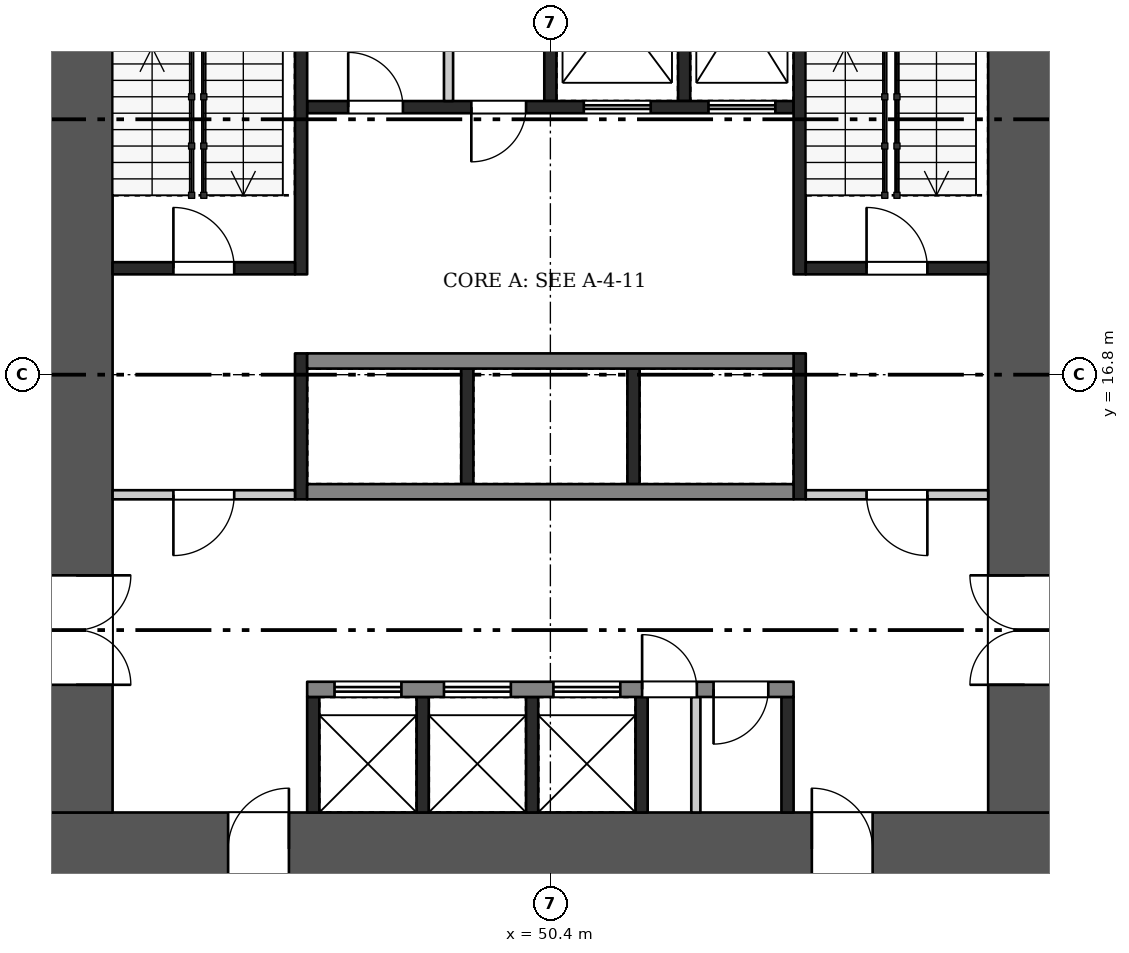
"""IFC4 building model, lengths in metres.
Left out: names, types, materials, properties, quantities, classifications, styles, units other than length and angle.
Written with IfcOpenShell. Run it as: python <this file> out.ifc"""

import sys

from ifc_helpers import new_model, si_unit, direction, frame, frame_2d, origin, place, context, subcontext, project, spatial, rectangle, extrude, element, fill, save


model = new_model("IFC4")
c1 = context("Model", 3, precision=1e-05, world=origin(), true_north=direction((0.0, 1.0)))
c2 = subcontext(c1, "Body", "Model", "MODEL_VIEW")
j1 = project(units=[si_unit("LENGTHUNIT", "METRE"), si_unit("PLANEANGLEUNIT", "RADIAN")], contexts=[c1])
p1 = place(None, origin())
s1 = spatial("IfcSite", under=j1, at=p1, CompositionType="ELEMENT")
p2 = place(p1, origin())
s2 = spatial("IfcBuilding", under=s1, at=p2, CompositionType="ELEMENT")
p3 = place(p2, frame((0.0, 0.0, 46.2)))
s3 = spatial("IfcBuildingStorey", under=s2, at=p3, CompositionType="ELEMENT", Elevation=46.2)
p4 = place(p3, frame((42.0, 9.0, 0.0), z_axis=(0.0, 0.0, 1.0), x_axis=(1.0, 0.0, 0.0)))
e1 = element("IfcWall", 1, at=p4, inside=s3, PredefinedType="SHEAR", context=c2, shape_type="SweptSolid", body=[
    extrude(rectangle(XDim=16.8, YDim=1.2, at=frame_2d((8.4, 0.0))), origin(), (0.0, 0.0, 1.0), 3.22),
])
p5 = place(p4, frame((3.1, 0.0, 0.0)))
e2 = element("IfcOpeningElement", 2, at=p5, cuts=e1, PredefinedType="OPENING", context=c2, shape_type="SweptSolid", body=[
    extrude(rectangle(XDim=1.0, YDim=2.1, at=frame_2d((0.5, 1.05))), frame((0.0, 0.61, 0.0), z_axis=(0.0, -1.0, 0.0), x_axis=(1.0, 0.0, 0.0)), (0.0, 0.0, 1.0), 1.22),
])
p6 = place(p4, frame((12.7, 0.0, 0.0)))
e3 = element("IfcOpeningElement", 3, at=p6, cuts=e1, PredefinedType="OPENING", context=c2, shape_type="SweptSolid", body=[
    extrude(rectangle(XDim=1.0, YDim=2.1, at=frame_2d((0.5, 1.05))), frame((0.0, 0.61, 0.0), z_axis=(0.0, -1.0, 0.0), x_axis=(1.0, 0.0, 0.0)), (0.0, 0.0, 1.0), 1.22),
])
p7 = place(p3, frame((42.6, 9.6, 0.0), z_axis=(0.0, 0.0, 1.0), x_axis=(0.0, 1.0, 0.0)))
e4 = element("IfcWall", 4, at=p7, inside=s3, PredefinedType="SHEAR", context=c2, shape_type="SweptSolid", body=[
    extrude(rectangle(XDim=14.4, YDim=1.2, at=frame_2d((7.2, 0.0))), origin(), (0.0, 0.0, 1.0), 3.22),
])
p8 = place(p7, frame((2.1, 0.0, 0.0)))
e5 = element("IfcOpeningElement", 5, at=p8, cuts=e4, PredefinedType="OPENING", context=c2, shape_type="SweptSolid", body=[
    extrude(rectangle(XDim=1.8, YDim=2.1, at=frame_2d((0.9, 1.05))), frame((0.0, 0.61, 0.0), z_axis=(0.0, -1.0, 0.0), x_axis=(1.0, 0.0, 0.0)), (0.0, 0.0, 1.0), 1.22),
])
p9 = place(p3, frame((58.2, 9.6, 0.0), z_axis=(0.0, 0.0, 1.0), x_axis=(0.0, 1.0, 0.0)))
e6 = element("IfcWall", 6, at=p9, inside=s3, PredefinedType="SHEAR", context=c2, shape_type="SweptSolid", body=[
    extrude(rectangle(XDim=14.4, YDim=1.2, at=frame_2d((7.2, 0.0))), origin(), (0.0, 0.0, 1.0), 3.22),
])
p10 = place(p9, frame((2.1, 0.0, 0.0)))
e7 = element("IfcOpeningElement", 7, at=p10, cuts=e6, PredefinedType="OPENING", context=c2, shape_type="SweptSolid", body=[
    extrude(rectangle(XDim=1.8, YDim=2.1, at=frame_2d((0.9, 1.05))), frame((0.0, 0.61, 0.0), z_axis=(0.0, -1.0, 0.0), x_axis=(1.0, 0.0, 0.0)), (0.0, 0.0, 1.0), 1.22),
])
for number, where, z_axis, x_axis in (
    (8, (46.5, 9.6, 0.0), (0.0, 0.0, 1.0), (0.0, 1.0, 0.0)),
    (9, (48.3, 9.6, 0.0), (0.0, 0.0, 1.0), (0.0, 1.0, 0.0)),
    (10, (50.1, 9.6, 0.0), (0.0, 0.0, 1.0), (0.0, 1.0, 0.0)),
    (11, (51.9, 9.6, 0.0), (0.0, 0.0, 1.0), (0.0, 1.0, 0.0)),
    (12, (54.3, 9.6, 0.0), (0.0, 0.0, 1.0), (0.0, 1.0, 0.0)),
):
    element("IfcWall", number, at=place(p3, frame(where, z_axis=z_axis, x_axis=x_axis)), inside=s3, PredefinedType="SHEAR", context=c2, shape_type="SweptSolid", body=[
        extrude(rectangle(XDim=1.9, YDim=0.2, at=frame_2d((0.95, 0.0))), origin(), (0.0, 0.0, 1.0), 3.22),
    ])
p11 = place(p3, frame((52.792, 9.6, 0.0), z_axis=(0.0, 0.0, 1.0), x_axis=(0.0, 1.0, 0.0)))
e13 = element("IfcWall", 13, at=p11, inside=s3, PredefinedType="PARTITIONING", context=c2, shape_type="SweptSolid", body=[
    extrude(rectangle(XDim=1.9, YDim=0.15, at=frame_2d((0.95, 0.0))), origin(), (0.0, 0.0, 1.0), 3.22),
])
p12 = place(p3, frame((46.4, 11.625, 0.0), z_axis=(0.0, 0.0, 1.0), x_axis=(1.0, 0.0, 0.0)))
e14 = element("IfcWall", 14, at=p12, inside=s3, PredefinedType="SHEAR", context=c2, shape_type="SweptSolid", body=[
    extrude(rectangle(XDim=8.0, YDim=0.25, at=frame_2d((4.0, 0.0))), origin(), (0.0, 0.0, 1.0), 3.22),
])
p13 = place(p12, frame((0.45, 0.0, 0.0)))
e15 = element("IfcOpeningElement", 15, at=p13, cuts=e14, PredefinedType="OPENING", context=c2, shape_type="SweptSolid", body=[
    extrude(rectangle(XDim=1.1, YDim=2.1, at=frame_2d((0.55, 1.05))), frame((0.0, 0.135, 0.0), z_axis=(0.0, -1.0, 0.0), x_axis=(1.0, 0.0, 0.0)), (0.0, 0.0, 1.0), 0.27),
])
p14 = place(p12, frame((2.25, 0.0, 0.0)))
e16 = element("IfcOpeningElement", 16, at=p14, cuts=e14, PredefinedType="OPENING", context=c2, shape_type="SweptSolid", body=[
    extrude(rectangle(XDim=1.1, YDim=2.1, at=frame_2d((0.55, 1.05))), frame((0.0, 0.135, 0.0), z_axis=(0.0, -1.0, 0.0), x_axis=(1.0, 0.0, 0.0)), (0.0, 0.0, 1.0), 0.27),
])
p15 = place(p12, frame((4.05, 0.0, 0.0)))
e17 = element("IfcOpeningElement", 17, at=p15, cuts=e14, PredefinedType="OPENING", context=c2, shape_type="SweptSolid", body=[
    extrude(rectangle(XDim=1.1, YDim=2.1, at=frame_2d((0.55, 1.05))), frame((0.0, 0.135, 0.0), z_axis=(0.0, -1.0, 0.0), x_axis=(1.0, 0.0, 0.0)), (0.0, 0.0, 1.0), 0.27),
])
p16 = place(p12, frame((5.509, 0.0, 0.0)))
e18 = element("IfcOpeningElement", 18, at=p16, cuts=e14, PredefinedType="OPENING", context=c2, shape_type="SweptSolid", body=[
    extrude(rectangle(XDim=0.9, YDim=2.1, at=frame_2d((0.45, 1.05))), frame((0.0, 0.135, 0.0), z_axis=(0.0, -1.0, 0.0), x_axis=(1.0, 0.0, 0.0)), (0.0, 0.0, 1.0), 0.27),
])
p17 = place(p12, frame((6.684, 0.0, 0.0)))
e19 = element("IfcOpeningElement", 19, at=p17, cuts=e14, PredefinedType="OPENING", context=c2, shape_type="SweptSolid", body=[
    extrude(rectangle(XDim=0.9, YDim=2.1, at=frame_2d((0.45, 1.05))), frame((0.0, 0.135, 0.0), z_axis=(0.0, -1.0, 0.0), x_axis=(1.0, 0.0, 0.0)), (0.0, 0.0, 1.0), 0.27),
])
for number, where, z_axis, x_axis in (
    (20, (49.033, 15.0, 0.0), (0.0, 0.0, 1.0), (0.0, 1.0, 0.0)),
    (21, (51.767, 15.0, 0.0), (0.0, 0.0, 1.0), (0.0, 1.0, 0.0)),
):
    element("IfcWall", number, at=place(p3, frame(where, z_axis=z_axis, x_axis=x_axis)), inside=s3, PredefinedType="SHEAR", context=c2, shape_type="SweptSolid", body=[
        extrude(rectangle(XDim=1.9, YDim=0.2, at=frame_2d((0.95, 0.0))), origin(), (0.0, 0.0, 1.0), 3.22),
    ])
for number, where, z_axis, x_axis in (
    (22, (46.4, 14.875, 0.0), (0.0, 0.0, 1.0), (1.0, 0.0, 0.0)),
    (23, (46.4, 17.025, 0.0), (0.0, 0.0, 1.0), (1.0, 0.0, 0.0)),
):
    element("IfcWall", number, at=place(p3, frame(where, z_axis=z_axis, x_axis=x_axis)), inside=s3, PredefinedType="SHEAR", context=c2, shape_type="SweptSolid", body=[
        extrude(rectangle(XDim=8.0, YDim=0.25, at=frame_2d((4.0, 0.0))), origin(), (0.0, 0.0, 1.0), 3.22),
    ])
for number, where, z_axis, x_axis in (
    (24, (50.4, 21.3, 0.0), (0.0, 0.0, 1.0), (0.0, 1.0, 0.0)),
    (25, (52.6, 21.3, 0.0), (0.0, 0.0, 1.0), (0.0, 1.0, 0.0)),
):
    element("IfcWall", number, at=place(p3, frame(where, z_axis=z_axis, x_axis=x_axis)), inside=s3, PredefinedType="SHEAR", context=c2, shape_type="SweptSolid", body=[
        extrude(rectangle(XDim=2.7, YDim=0.2, at=frame_2d((1.35, 0.0))), origin(), (0.0, 0.0, 1.0), 3.22),
    ])
p18 = place(p3, frame((48.725, 21.3, 0.0), z_axis=(0.0, 0.0, 1.0), x_axis=(0.0, 1.0, 0.0)))
e26 = element("IfcWall", 26, at=p18, inside=s3, PredefinedType="PARTITIONING", context=c2, shape_type="SweptSolid", body=[
    extrude(rectangle(XDim=2.7, YDim=0.15, at=frame_2d((1.35, 0.0))), origin(), (0.0, 0.0, 1.0), 3.22),
])
p19 = place(p3, frame((46.4, 21.2, 0.0), z_axis=(0.0, 0.0, 1.0), x_axis=(1.0, 0.0, 0.0)))
e27 = element("IfcWall", 27, at=p19, inside=s3, PredefinedType="SHEAR", context=c2, shape_type="SweptSolid", body=[
    extrude(rectangle(XDim=8.0, YDim=0.2, at=frame_2d((4.0, 0.0))), origin(), (0.0, 0.0, 1.0), 3.22),
])
p20 = place(p19, frame((0.675, 0.0, 0.0)))
e28 = element("IfcOpeningElement", 28, at=p20, cuts=e27, PredefinedType="OPENING", context=c2, shape_type="SweptSolid", body=[
    extrude(rectangle(XDim=0.9, YDim=2.1, at=frame_2d((0.45, 1.05))), frame((0.0, 0.11, 0.0), z_axis=(0.0, -1.0, 0.0), x_axis=(1.0, 0.0, 0.0)), (0.0, 0.0, 1.0), 0.22),
])
p21 = place(p19, frame((2.7, 0.0, 0.0)))
e29 = element("IfcOpeningElement", 29, at=p21, cuts=e27, PredefinedType="OPENING", context=c2, shape_type="SweptSolid", body=[
    extrude(rectangle(XDim=0.9, YDim=2.1, at=frame_2d((0.45, 1.05))), frame((0.0, 0.11, 0.0), z_axis=(0.0, -1.0, 0.0), x_axis=(1.0, 0.0, 0.0)), (0.0, 0.0, 1.0), 0.22),
])
p22 = place(p19, frame((4.55, 0.0, 0.0)))
e30 = element("IfcOpeningElement", 30, at=p22, cuts=e27, PredefinedType="OPENING", context=c2, shape_type="SweptSolid", body=[
    extrude(rectangle(XDim=1.1, YDim=2.1, at=frame_2d((0.55, 1.05))), frame((0.0, 0.11, 0.0), z_axis=(0.0, -1.0, 0.0), x_axis=(1.0, 0.0, 0.0)), (0.0, 0.0, 1.0), 0.22),
])
p23 = place(p19, frame((6.6, 0.0, 0.0)))
e31 = element("IfcOpeningElement", 31, at=p23, cuts=e27, PredefinedType="OPENING", context=c2, shape_type="SweptSolid", body=[
    extrude(rectangle(XDim=1.1, YDim=2.1, at=frame_2d((0.55, 1.05))), frame((0.0, 0.11, 0.0), z_axis=(0.0, -1.0, 0.0), x_axis=(1.0, 0.0, 0.0)), (0.0, 0.0, 1.0), 0.22),
])
p24 = place(p3, frame((46.3, 14.75, 0.0), z_axis=(0.0, 0.0, 1.0), x_axis=(0.0, 1.0, 0.0)))
e32 = element("IfcWall", 32, at=p24, inside=s3, PredefinedType="SHEAR", context=c2, shape_type="SweptSolid", body=[
    extrude(rectangle(XDim=2.4, YDim=0.2, at=frame_2d((1.2, 0.0))), origin(), (0.0, 0.0, 1.0), 3.22),
])
p25 = place(p3, frame((46.3, 18.45, 0.0), z_axis=(0.0, 0.0, 1.0), x_axis=(0.0, 1.0, 0.0)))
e33 = element("IfcWall", 33, at=p25, inside=s3, PredefinedType="SHEAR", context=c2, shape_type="SweptSolid", body=[
    extrude(rectangle(XDim=5.55, YDim=0.2, at=frame_2d((2.775, 0.0))), origin(), (0.0, 0.0, 1.0), 3.22),
])
p26 = place(p3, frame((43.2, 14.825, 0.0), z_axis=(0.0, 0.0, 1.0), x_axis=(1.0, 0.0, 0.0)))
e34 = element("IfcWall", 34, at=p26, inside=s3, PredefinedType="PARTITIONING", context=c2, shape_type="SweptSolid", body=[
    extrude(rectangle(XDim=3.0, YDim=0.15, at=frame_2d((1.5, 0.0))), origin(), (0.0, 0.0, 1.0), 3.22),
])
p27 = place(p26, frame((1.0, 0.0, 0.0)))
e35 = element("IfcOpeningElement", 35, at=p27, cuts=e34, PredefinedType="OPENING", context=c2, shape_type="SweptSolid", body=[
    extrude(rectangle(XDim=1.0, YDim=2.1, at=frame_2d((0.5, 1.05))), frame((0.0, 0.085, 0.0), z_axis=(0.0, -1.0, 0.0), x_axis=(1.0, 0.0, 0.0)), (0.0, 0.0, 1.0), 0.17),
])
p28 = place(p3, frame((43.2, 18.55, 0.0), z_axis=(0.0, 0.0, 1.0), x_axis=(1.0, 0.0, 0.0)))
e36 = element("IfcWall", 36, at=p28, inside=s3, PredefinedType="SHEAR", context=c2, shape_type="SweptSolid", body=[
    extrude(rectangle(XDim=3.0, YDim=0.2, at=frame_2d((1.5, 0.0))), origin(), (0.0, 0.0, 1.0), 3.22),
])
p29 = place(p28, frame((1.0, 0.0, 0.0)))
e37 = element("IfcOpeningElement", 37, at=p29, cuts=e36, PredefinedType="OPENING", context=c2, shape_type="SweptSolid", body=[
    extrude(rectangle(XDim=1.0, YDim=2.1, at=frame_2d((0.5, 1.05))), frame((0.0, 0.11, 0.0), z_axis=(0.0, -1.0, 0.0), x_axis=(1.0, 0.0, 0.0)), (0.0, 0.0, 1.0), 0.22),
])
p30 = place(p3, frame((54.5, 14.75, 0.0), z_axis=(0.0, 0.0, 1.0), x_axis=(0.0, 1.0, 0.0)))
e38 = element("IfcWall", 38, at=p30, inside=s3, PredefinedType="SHEAR", context=c2, shape_type="SweptSolid", body=[
    extrude(rectangle(XDim=2.4, YDim=0.2, at=frame_2d((1.2, 0.0))), origin(), (0.0, 0.0, 1.0), 3.22),
])
p31 = place(p3, frame((54.5, 18.45, 0.0), z_axis=(0.0, 0.0, 1.0), x_axis=(0.0, 1.0, 0.0)))
e39 = element("IfcWall", 39, at=p31, inside=s3, PredefinedType="SHEAR", context=c2, shape_type="SweptSolid", body=[
    extrude(rectangle(XDim=5.55, YDim=0.2, at=frame_2d((2.775, 0.0))), origin(), (0.0, 0.0, 1.0), 3.22),
])
p32 = place(p3, frame((54.6, 14.825, 0.0), z_axis=(0.0, 0.0, 1.0), x_axis=(1.0, 0.0, 0.0)))
e40 = element("IfcWall", 40, at=p32, inside=s3, PredefinedType="PARTITIONING", context=c2, shape_type="SweptSolid", body=[
    extrude(rectangle(XDim=3.0, YDim=0.15, at=frame_2d((1.5, 0.0))), origin(), (0.0, 0.0, 1.0), 3.22),
])
p33 = place(p32, frame((1.0, 0.0, 0.0)))
e41 = element("IfcOpeningElement", 41, at=p33, cuts=e40, PredefinedType="OPENING", context=c2, shape_type="SweptSolid", body=[
    extrude(rectangle(XDim=1.0, YDim=2.1, at=frame_2d((0.5, 1.05))), frame((0.0, 0.085, 0.0), z_axis=(0.0, -1.0, 0.0), x_axis=(1.0, 0.0, 0.0)), (0.0, 0.0, 1.0), 0.17),
])
p34 = place(p3, frame((54.6, 18.55, 0.0), z_axis=(0.0, 0.0, 1.0), x_axis=(1.0, 0.0, 0.0)))
e42 = element("IfcWall", 42, at=p34, inside=s3, PredefinedType="SHEAR", context=c2, shape_type="SweptSolid", body=[
    extrude(rectangle(XDim=3.0, YDim=0.2, at=frame_2d((1.5, 0.0))), origin(), (0.0, 0.0, 1.0), 3.22),
])
p35 = place(p34, frame((1.0, 0.0, 0.0)))
e43 = element("IfcOpeningElement", 43, at=p35, cuts=e42, PredefinedType="OPENING", context=c2, shape_type="SweptSolid", body=[
    extrude(rectangle(XDim=1.0, YDim=2.1, at=frame_2d((0.5, 1.05))), frame((0.0, 0.11, 0.0), z_axis=(0.0, -1.0, 0.0), x_axis=(1.0, 0.0, 0.0)), (0.0, 0.0, 1.0), 0.22),
])
p36 = place(p5, origin())
e44 = element("IfcDoor", 44, at=p36, inside=s3, OperationType="SINGLE_SWING_RIGHT", PredefinedType="DOOR", context=c2, shape_type="SweptSolid", body=[
    extrude(rectangle(XDim=1.0, YDim=2.1, at=frame_2d((0.5, 1.05))), frame((0.0, 0.025, 0.0), z_axis=(0.0, -1.0, 0.0), x_axis=(1.0, 0.0, 0.0)), (0.0, 0.0, 1.0), 0.05),
])
fill(e2, e44)
p37 = place(p6, origin())
e45 = element("IfcDoor", 45, at=p37, inside=s3, OperationType="SINGLE_SWING_LEFT", PredefinedType="DOOR", context=c2, shape_type="SweptSolid", body=[
    extrude(rectangle(XDim=1.0, YDim=2.1, at=frame_2d((0.5, 1.05))), frame((0.0, 0.025, 0.0), z_axis=(0.0, -1.0, 0.0), x_axis=(1.0, 0.0, 0.0)), (0.0, 0.0, 1.0), 0.05),
])
fill(e3, e45)
p38 = place(p8, frame((1.8, 0.0, 0.0), z_axis=(0.0, 0.0, 1.0), x_axis=(-1.0, 0.0, 0.0)))
e46 = element("IfcDoor", 46, at=p38, inside=s3, OperationType="DOUBLE_DOOR_SINGLE_SWING", PredefinedType="DOOR", context=c2, shape_type="SweptSolid", body=[
    extrude(rectangle(XDim=1.8, YDim=2.1, at=frame_2d((0.9, 1.05))), frame((0.0, 0.025, 0.0), z_axis=(0.0, -1.0, 0.0), x_axis=(1.0, 0.0, 0.0)), (0.0, 0.0, 1.0), 0.05),
])
fill(e5, e46)
p39 = place(p10, origin())
e47 = element("IfcDoor", 47, at=p39, inside=s3, OperationType="DOUBLE_DOOR_SINGLE_SWING", PredefinedType="DOOR", context=c2, shape_type="SweptSolid", body=[
    extrude(rectangle(XDim=1.8, YDim=2.1, at=frame_2d((0.9, 1.05))), frame((0.0, 0.025, 0.0), z_axis=(0.0, -1.0, 0.0), x_axis=(1.0, 0.0, 0.0)), (0.0, 0.0, 1.0), 0.05),
])
fill(e7, e47)
p40 = place(p13, origin())
e48 = element("IfcDoor", 48, at=p40, inside=s3, OperationType="DOUBLE_DOOR_SLIDING", PredefinedType="DOOR", context=c2, shape_type="SweptSolid", body=[
    extrude(rectangle(XDim=1.1, YDim=2.1, at=frame_2d((0.55, 1.05))), frame((0.0, 0.025, 0.0), z_axis=(0.0, -1.0, 0.0), x_axis=(1.0, 0.0, 0.0)), (0.0, 0.0, 1.0), 0.05),
])
fill(e15, e48)
p41 = place(p14, origin())
e49 = element("IfcDoor", 49, at=p41, inside=s3, OperationType="DOUBLE_DOOR_SLIDING", PredefinedType="DOOR", context=c2, shape_type="SweptSolid", body=[
    extrude(rectangle(XDim=1.1, YDim=2.1, at=frame_2d((0.55, 1.05))), frame((0.0, 0.025, 0.0), z_axis=(0.0, -1.0, 0.0), x_axis=(1.0, 0.0, 0.0)), (0.0, 0.0, 1.0), 0.05),
])
fill(e16, e49)
p42 = place(p15, origin())
e50 = element("IfcDoor", 50, at=p42, inside=s3, OperationType="DOUBLE_DOOR_SLIDING", PredefinedType="DOOR", context=c2, shape_type="SweptSolid", body=[
    extrude(rectangle(XDim=1.1, YDim=2.1, at=frame_2d((0.55, 1.05))), frame((0.0, 0.025, 0.0), z_axis=(0.0, -1.0, 0.0), x_axis=(1.0, 0.0, 0.0)), (0.0, 0.0, 1.0), 0.05),
])
fill(e17, e50)
p43 = place(p16, origin())
e51 = element("IfcDoor", 51, at=p43, inside=s3, OperationType="SINGLE_SWING_LEFT", PredefinedType="DOOR", context=c2, shape_type="SweptSolid", body=[
    extrude(rectangle(XDim=0.9, YDim=2.1, at=frame_2d((0.45, 1.05))), frame((0.0, 0.025, 0.0), z_axis=(0.0, -1.0, 0.0), x_axis=(1.0, 0.0, 0.0)), (0.0, 0.0, 1.0), 0.05),
])
fill(e18, e51)
p44 = place(p17, frame((0.9, 0.0, 0.0), z_axis=(0.0, 0.0, 1.0), x_axis=(-1.0, 0.0, 0.0)))
e52 = element("IfcDoor", 52, at=p44, inside=s3, OperationType="SINGLE_SWING_RIGHT", PredefinedType="DOOR", context=c2, shape_type="SweptSolid", body=[
    extrude(rectangle(XDim=0.9, YDim=2.1, at=frame_2d((0.45, 1.05))), frame((0.0, 0.025, 0.0), z_axis=(0.0, -1.0, 0.0), x_axis=(1.0, 0.0, 0.0)), (0.0, 0.0, 1.0), 0.05),
])
fill(e19, e52)
p45 = place(p20, origin())
e53 = element("IfcDoor", 53, at=p45, inside=s3, OperationType="SINGLE_SWING_LEFT", PredefinedType="DOOR", context=c2, shape_type="SweptSolid", body=[
    extrude(rectangle(XDim=0.9, YDim=2.1, at=frame_2d((0.45, 1.05))), frame((0.0, 0.025, 0.0), z_axis=(0.0, -1.0, 0.0), x_axis=(1.0, 0.0, 0.0)), (0.0, 0.0, 1.0), 0.05),
])
fill(e28, e53)
p46 = place(p21, frame((0.9, 0.0, 0.0), z_axis=(0.0, 0.0, 1.0), x_axis=(-1.0, 0.0, 0.0)))
e54 = element("IfcDoor", 54, at=p46, inside=s3, OperationType="SINGLE_SWING_RIGHT", PredefinedType="DOOR", context=c2, shape_type="SweptSolid", body=[
    extrude(rectangle(XDim=0.9, YDim=2.1, at=frame_2d((0.45, 1.05))), frame((0.0, 0.025, 0.0), z_axis=(0.0, -1.0, 0.0), x_axis=(1.0, 0.0, 0.0)), (0.0, 0.0, 1.0), 0.05),
])
fill(e29, e54)
p47 = place(p22, origin())
e55 = element("IfcDoor", 55, at=p47, inside=s3, OperationType="DOUBLE_DOOR_SLIDING", PredefinedType="DOOR", context=c2, shape_type="SweptSolid", body=[
    extrude(rectangle(XDim=1.1, YDim=2.1, at=frame_2d((0.55, 1.05))), frame((0.0, 0.025, 0.0), z_axis=(0.0, -1.0, 0.0), x_axis=(1.0, 0.0, 0.0)), (0.0, 0.0, 1.0), 0.05),
])
fill(e30, e55)
p48 = place(p23, origin())
e56 = element("IfcDoor", 56, at=p48, inside=s3, OperationType="DOUBLE_DOOR_SLIDING", PredefinedType="DOOR", context=c2, shape_type="SweptSolid", body=[
    extrude(rectangle(XDim=1.1, YDim=2.1, at=frame_2d((0.55, 1.05))), frame((0.0, 0.025, 0.0), z_axis=(0.0, -1.0, 0.0), x_axis=(1.0, 0.0, 0.0)), (0.0, 0.0, 1.0), 0.05),
])
fill(e31, e56)
p49 = place(p27, frame((1.0, 0.0, 0.0), z_axis=(0.0, 0.0, 1.0), x_axis=(-1.0, 0.0, 0.0)))
e57 = element("IfcDoor", 57, at=p49, inside=s3, OperationType="SINGLE_SWING_RIGHT", PredefinedType="DOOR", context=c2, shape_type="SweptSolid", body=[
    extrude(rectangle(XDim=1.0, YDim=2.1, at=frame_2d((0.5, 1.05))), frame((0.0, 0.025, 0.0), z_axis=(0.0, -1.0, 0.0), x_axis=(1.0, 0.0, 0.0)), (0.0, 0.0, 1.0), 0.05),
])
fill(e35, e57)
p50 = place(p29, origin())
e58 = element("IfcDoor", 58, at=p50, inside=s3, OperationType="SINGLE_SWING_LEFT", PredefinedType="DOOR", context=c2, shape_type="SweptSolid", body=[
    extrude(rectangle(XDim=1.0, YDim=2.1, at=frame_2d((0.5, 1.05))), frame((0.0, 0.025, 0.0), z_axis=(0.0, -1.0, 0.0), x_axis=(1.0, 0.0, 0.0)), (0.0, 0.0, 1.0), 0.05),
])
fill(e37, e58)
p51 = place(p33, frame((1.0, 0.0, 0.0), z_axis=(0.0, 0.0, 1.0), x_axis=(-1.0, 0.0, 0.0)))
e59 = element("IfcDoor", 59, at=p51, inside=s3, OperationType="SINGLE_SWING_LEFT", PredefinedType="DOOR", context=c2, shape_type="SweptSolid", body=[
    extrude(rectangle(XDim=1.0, YDim=2.1, at=frame_2d((0.5, 1.05))), frame((0.0, 0.025, 0.0), z_axis=(0.0, -1.0, 0.0), x_axis=(1.0, 0.0, 0.0)), (0.0, 0.0, 1.0), 0.05),
])
fill(e41, e59)
p52 = place(p35, origin())
e60 = element("IfcDoor", 60, at=p52, inside=s3, OperationType="SINGLE_SWING_LEFT", PredefinedType="DOOR", context=c2, shape_type="SweptSolid", body=[
    extrude(rectangle(XDim=1.0, YDim=2.1, at=frame_2d((0.5, 1.05))), frame((0.0, 0.025, 0.0), z_axis=(0.0, -1.0, 0.0), x_axis=(1.0, 0.0, 0.0)), (0.0, 0.0, 1.0), 0.05),
])
fill(e43, e60)
save(model, sys.argv[1])
